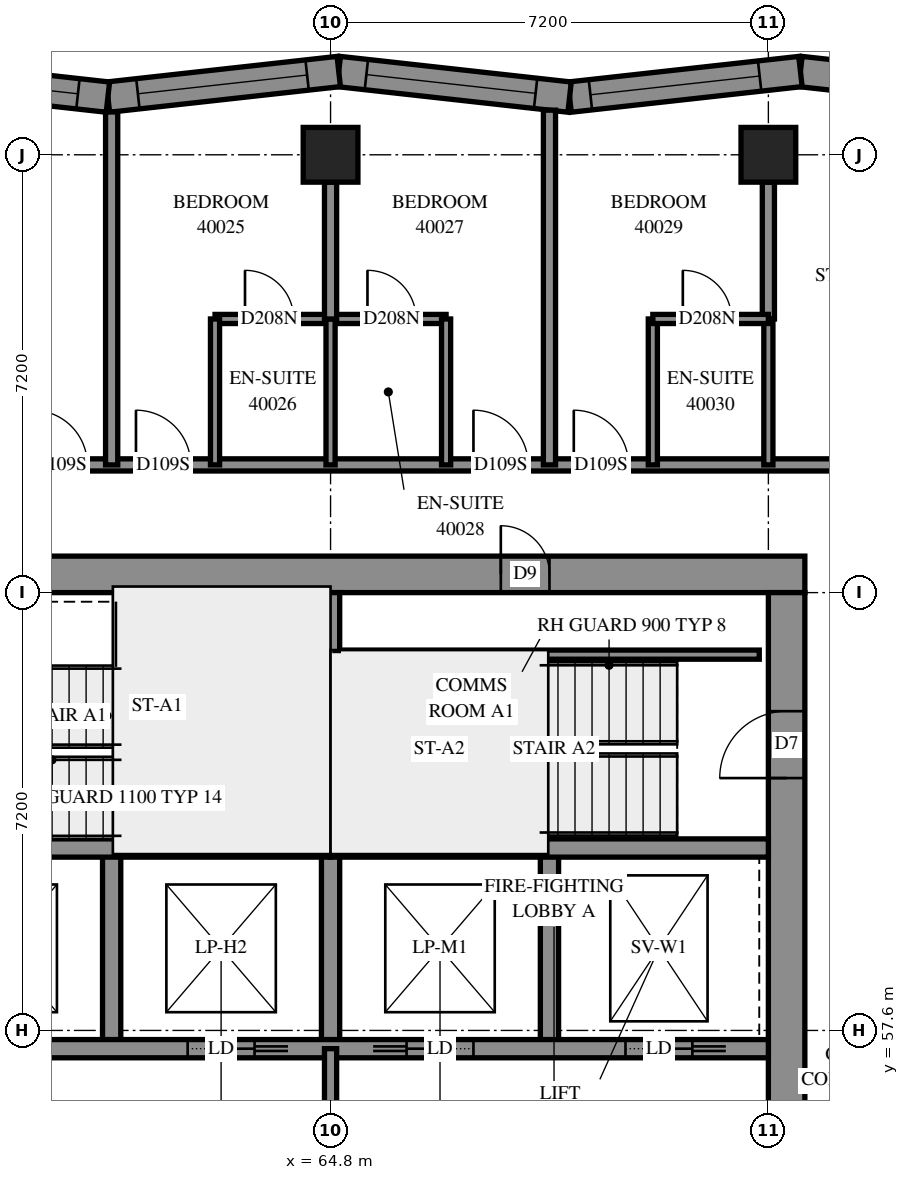
"""IFC4 building model, lengths in metres.
Left out: names, types, materials, properties, quantities, classifications, styles, units other than length and angle.
Written with IfcOpenShell. Run it as: python <this file> out.ifc"""

import sys

from ifc_helpers import new_model, si_unit, direction, frame, frame_2d, origin, origin_2d, place, context, subcontext, project, spatial, polyline, rectangle, outline, extrude, element, fill, save


model = new_model("IFC4")
c1 = context("Model", 3, precision=1e-05, world=origin(), true_north=direction((0.0, 1.0)))
c2 = subcontext(c1, "Body", "Model", "MODEL_VIEW")
j1 = project(units=[si_unit("LENGTHUNIT", "METRE"), si_unit("PLANEANGLEUNIT", "RADIAN")], contexts=[c1])
p1 = place(None, origin())
s1 = spatial("IfcSite", under=j1, at=p1, CompositionType="ELEMENT")
p2 = place(p1, origin())
s2 = spatial("IfcBuilding", under=s1, at=p2, CompositionType="ELEMENT")
p3 = place(p2, frame((0.0, 0.0, 149.0)))
s3 = spatial("IfcBuildingStorey", under=s2, at=p3, CompositionType="ELEMENT", Elevation=149.0)
for number, where, z_axis, x_axis in (
    (1, (64.8, 72.0, 0.0), (0.0, 0.0, 1.0), (1.0, 0.0, 0.0)),
    (2, (72.0, 72.0, 0.0), (0.0, 0.0, 1.0), (1.0, 0.0, 0.0)),
):
    element("IfcColumn", number, at=place(p3, frame(where, z_axis=z_axis, x_axis=x_axis)), inside=s3, PredefinedType="COLUMN", context=c2, shape_type="SweptSolid", body=[
        extrude(rectangle(XDim=0.9, YDim=0.9, at=origin_2d()), origin(), (0.0, 0.0, 1.0), 3.1),
    ])
p4 = place(p3, frame((57.0, 65.1, -0.3), z_axis=(0.0, 0.0, 1.0), x_axis=(1.0, 0.0, 0.0)))
e3 = element("IfcWall", 3, at=p4, inside=s3, PredefinedType="SHEAR", context=c2, shape_type="SweptSolid", body=[
    extrude(rectangle(XDim=15.6, YDim=0.6, at=frame_2d((7.8, 0.0))), origin(), (0.0, 0.0, 1.0), 2.7),
])
p5 = place(p4, frame((10.6, 0.0, 0.3)))
e4 = element("IfcOpeningElement", 4, at=p5, cuts=e3, PredefinedType="OPENING", context=c2, shape_type="SweptSolid", body=[
    extrude(rectangle(XDim=0.8, YDim=2.1, at=frame_2d((0.4, 1.05))), frame((0.0, 0.31, 0.0), z_axis=(0.0, -1.0, 0.0), x_axis=(1.0, 0.0, 0.0)), (0.0, 0.0, 1.0), 0.62),
])
p6 = place(p3, frame((72.3, 50.4, -0.3), z_axis=(0.0, 0.0, 1.0), x_axis=(0.0, 1.0, 0.0)))
e5 = element("IfcWall", 5, at=p6, inside=s3, PredefinedType="SHEAR", context=c2, shape_type="SweptSolid", body=[
    extrude(rectangle(XDim=14.4, YDim=0.6, at=frame_2d((7.2, 0.0))), origin(), (0.0, 0.0, 1.0), 2.7),
])
p7 = place(p6, frame((4.55, 0.0, 0.3)))
e6 = element("IfcOpeningElement", 6, at=p7, cuts=e5, PredefinedType="OPENING", context=c2, shape_type="SweptSolid", body=[
    extrude(rectangle(XDim=1.1, YDim=2.1, at=frame_2d((0.55, 1.05))), frame((0.0, 0.31, 0.0), z_axis=(0.0, -1.0, 0.0), x_axis=(1.0, 0.0, 0.0)), (0.0, 0.0, 1.0), 0.62),
])
p8 = place(p6, frame((11.35, 0.0, 0.3)))
e7 = element("IfcOpeningElement", 7, at=p8, cuts=e5, PredefinedType="OPENING", context=c2, shape_type="SweptSolid", body=[
    extrude(rectangle(XDim=1.1, YDim=2.1, at=frame_2d((0.55, 1.05))), frame((0.0, 0.31, 0.0), z_axis=(0.0, -1.0, 0.0), x_axis=(1.0, 0.0, 0.0)), (0.0, 0.0, 1.0), 0.62),
])
for number, where, z_axis, x_axis in (
    (8, (61.2, 57.3, 0.0), (0.0, 0.0, 1.0), (0.0, 1.0, 0.0)),
    (9, (64.8, 57.3, 0.0), (0.0, 0.0, 1.0), (0.0, 1.0, 0.0)),
    (10, (68.4, 57.3, 0.0), (0.0, 0.0, 1.0), (0.0, 1.0, 0.0)),
):
    element("IfcWall", number, at=place(p3, frame(where, z_axis=z_axis, x_axis=x_axis)), inside=s3, PredefinedType="SOLIDWALL", context=c2, shape_type="SweptSolid", body=[
        extrude(rectangle(XDim=3.3, YDim=0.3, at=frame_2d((1.65, 0.0))), origin(), (0.0, 0.0, 1.0), 3.1),
    ])
p9 = place(p3, frame((57.6, 57.3, 0.0), z_axis=(0.0, 0.0, 1.0), x_axis=(1.0, 0.0, 0.0)))
e11 = element("IfcWall", 11, at=p9, inside=s3, PredefinedType="SOLIDWALL", context=c2, shape_type="SweptSolid", body=[
    extrude(rectangle(XDim=14.4, YDim=0.3, at=frame_2d((7.2, 0.0))), origin(), (0.0, 0.0, 1.0), 3.1),
])
p10 = place(p9, frame((1.25, 0.0, 0.0)))
e12 = element("IfcOpeningElement", 12, at=p10, cuts=e11, PredefinedType="OPENING", context=c2, shape_type="SweptSolid", body=[
    extrude(rectangle(XDim=1.1, YDim=2.1, at=frame_2d((0.55, 1.05))), frame((0.0, 0.16, 0.0), z_axis=(0.0, -1.0, 0.0), x_axis=(1.0, 0.0, 0.0)), (0.0, 0.0, 1.0), 0.32),
])
p11 = place(p9, frame((4.85, 0.0, 0.0)))
e13 = element("IfcOpeningElement", 13, at=p11, cuts=e11, PredefinedType="OPENING", context=c2, shape_type="SweptSolid", body=[
    extrude(rectangle(XDim=1.1, YDim=2.1, at=frame_2d((0.55, 1.05))), frame((0.0, 0.16, 0.0), z_axis=(0.0, -1.0, 0.0), x_axis=(1.0, 0.0, 0.0)), (0.0, 0.0, 1.0), 0.32),
])
p12 = place(p9, frame((8.45, 0.0, 0.0)))
e14 = element("IfcOpeningElement", 14, at=p12, cuts=e11, PredefinedType="OPENING", context=c2, shape_type="SweptSolid", body=[
    extrude(rectangle(XDim=1.1, YDim=2.1, at=frame_2d((0.55, 1.05))), frame((0.0, 0.16, 0.0), z_axis=(0.0, -1.0, 0.0), x_axis=(1.0, 0.0, 0.0)), (0.0, 0.0, 1.0), 0.32),
])
p13 = place(p9, frame((12.05, 0.0, 0.0)))
e15 = element("IfcOpeningElement", 15, at=p13, cuts=e11, PredefinedType="OPENING", context=c2, shape_type="SweptSolid", body=[
    extrude(rectangle(XDim=1.1, YDim=2.1, at=frame_2d((0.55, 1.05))), frame((0.0, 0.16, 0.0), z_axis=(0.0, -1.0, 0.0), x_axis=(1.0, 0.0, 0.0)), (0.0, 0.0, 1.0), 0.32),
])
for number, where, z_axis, x_axis in (
    (16, (57.6, 60.6, 0.0), (0.0, 0.0, 1.0), (1.0, 0.0, 0.0)),
    (17, (64.8, 60.6, 0.0), (0.0, 0.0, 1.0), (1.0, 0.0, 0.0)),
):
    element("IfcWall", number, at=place(p3, frame(where, z_axis=z_axis, x_axis=x_axis)), inside=s3, PredefinedType="SOLIDWALL", context=c2, shape_type="SweptSolid", body=[
        extrude(rectangle(XDim=7.2, YDim=0.3, at=frame_2d((3.6, 0.0))), origin(), (0.0, 0.0, 1.0), 3.1),
    ])
p14 = place(p3, frame((64.8, 60.6, 0.0), z_axis=(0.0, 0.0, 1.0), x_axis=(0.0, 1.0, 0.0)))
e18 = element("IfcWall", 18, at=p14, inside=s3, PredefinedType="SOLIDWALL", context=c2, shape_type="SweptSolid", body=[
    extrude(rectangle(XDim=4.2, YDim=0.3, at=frame_2d((2.1, 0.0))), origin(), (0.0, 0.0, 1.0), 3.1),
])
p15 = place(p3, frame((76.343, 72.946, 0.0), z_axis=(0.0, 0.0, 1.0), x_axis=(-0.9939056334, 0.1102342595, 0.0)))
e19 = element("IfcWall", 19, at=p15, inside=s3, PredefinedType="SOLIDWALL", context=c2, shape_type="SweptSolid", body=[
    extrude(outline(polyline([(0.047, -0.25), (3.867, -0.25), (3.811, 0.25), (-0.047, 0.25), (0.047, -0.25)])), origin(), (0.0, 0.0, 1.0), 3.1),
])
p16 = place(p15, frame((1.579, 0.0, 0.45)))
e20 = element("IfcOpeningElement", 20, at=p16, cuts=e19, PredefinedType="OPENING", context=c2, shape_type="SweptSolid", body=[
    extrude(rectangle(XDim=1.2, YDim=2.5, at=frame_2d((0.6, 1.25))), frame((0.0, 0.26, 0.0), z_axis=(0.0, -1.0, 0.0), x_axis=(1.0, 0.0, 0.0)), (0.0, 0.0, 1.0), 0.52),
])
p17 = place(p3, frame((72.527, 73.37, 0.0), z_axis=(0.0, 0.0, 1.0), x_axis=(-0.99390702, -0.1102217568, 0.0)))
e21 = element("IfcWall", 21, at=p17, inside=s3, PredefinedType="SOLIDWALL", context=c2, shape_type="SweptSolid", body=[
    extrude(outline(polyline([(-0.028, -0.25), (3.792, -0.25), (3.847, 0.25), (0.028, 0.25), (-0.028, -0.25)])), origin(), (0.0, 0.0, 1.0), 3.1),
])
p18 = place(p17, frame((0.675, 0.0, 0.45)))
e22 = element("IfcOpeningElement", 22, at=p18, cuts=e21, PredefinedType="OPENING", context=c2, shape_type="SweptSolid", body=[
    extrude(rectangle(XDim=2.8, YDim=2.5, at=frame_2d((1.4, 1.25))), frame((0.0, 0.26, 0.0), z_axis=(0.0, -1.0, 0.0), x_axis=(1.0, 0.0, 0.0)), (0.0, 0.0, 1.0), 0.52),
])
p19 = place(p3, frame((68.731, 72.948, 0.0), z_axis=(0.0, 0.0, 1.0), x_axis=(-0.99390702, 0.1102217568, 0.0)))
e23 = element("IfcWall", 23, at=p19, inside=s3, PredefinedType="SOLIDWALL", context=c2, shape_type="SweptSolid", body=[
    extrude(outline(polyline([(0.028, -0.25), (3.847, -0.25), (3.792, 0.25), (-0.028, 0.25), (0.028, -0.25)])), origin(), (0.0, 0.0, 1.0), 3.1),
])
p20 = place(p19, frame((0.562, 0.0, 0.45)))
e24 = element("IfcOpeningElement", 24, at=p20, cuts=e23, PredefinedType="OPENING", context=c2, shape_type="SweptSolid", body=[
    extrude(rectangle(XDim=2.8, YDim=2.5, at=frame_2d((1.4, 1.25))), frame((0.0, 0.26, 0.0), z_axis=(0.0, -1.0, 0.0), x_axis=(1.0, 0.0, 0.0)), (0.0, 0.0, 1.0), 0.52),
])
p21 = place(p3, frame((64.935, 73.37, 0.0), z_axis=(0.0, 0.0, 1.0), x_axis=(-0.993907338, -0.1102188888, 0.0)))
e25 = element("IfcWall", 25, at=p21, inside=s3, PredefinedType="SOLIDWALL", context=c2, shape_type="SweptSolid", body=[
    extrude(outline(polyline([(-0.028, -0.25), (3.792, -0.25), (3.847, 0.25), (0.028, 0.25), (-0.028, -0.25)])), origin(), (0.0, 0.0, 1.0), 3.1),
])
p22 = place(p21, frame((0.524, 0.0, 0.45)))
e26 = element("IfcOpeningElement", 26, at=p22, cuts=e25, PredefinedType="OPENING", context=c2, shape_type="SweptSolid", body=[
    extrude(rectangle(XDim=2.8, YDim=2.5, at=frame_2d((1.4, 1.25))), frame((0.0, 0.26, 0.0), z_axis=(0.0, -1.0, 0.0), x_axis=(1.0, 0.0, 0.0)), (0.0, 0.0, 1.0), 0.52),
])
p23 = place(p3, frame((61.138, 72.948, 0.0), z_axis=(0.0, 0.0, 1.0), x_axis=(-0.99390702, 0.1102217568, 0.0)))
e27 = element("IfcWall", 27, at=p23, inside=s3, PredefinedType="SOLIDWALL", context=c2, shape_type="SweptSolid", body=[
    extrude(outline(polyline([(0.028, -0.25), (3.847, -0.25), (3.792, 0.25), (-0.028, 0.25), (0.028, -0.25)])), origin(), (0.0, 0.0, 1.0), 3.1),
])
p24 = place(p23, frame((0.496, 0.0, 0.45)))
e28 = element("IfcOpeningElement", 28, at=p24, cuts=e27, PredefinedType="OPENING", context=c2, shape_type="SweptSolid", body=[
    extrude(rectangle(XDim=2.8, YDim=2.5, at=frame_2d((1.4, 1.25))), frame((0.0, 0.26, 0.0), z_axis=(0.0, -1.0, 0.0), x_axis=(1.0, 0.0, 0.0)), (0.0, 0.0, 1.0), 0.52),
])
p25 = place(p3, frame((64.95, 63.78, 0.0), z_axis=(0.0, 0.0, 1.0), x_axis=(1.0, 0.0, 0.0)))
e29 = element("IfcWall", 29, at=p25, inside=s3, PredefinedType="PARTITIONING", context=c2, shape_type="SweptSolid", body=[
    extrude(rectangle(XDim=6.9, YDim=0.15, at=frame_2d((3.45, 0.0))), origin(), (0.0, 0.0, 1.0), 3.1),
])
p26 = place(p3, frame((64.8, 53.7, 0.0), z_axis=(0.0, 0.0, 1.0), x_axis=(0.0, 1.0, 0.0)))
e30 = element("IfcWall", 30, at=p26, inside=s3, PredefinedType="PARTITIONING", context=c2, shape_type="SweptSolid", body=[
    extrude(rectangle(XDim=3.6, YDim=0.2, at=frame_2d((1.8, 0.0))), origin(), (0.0, 0.0, 1.0), 3.1),
])
p27 = place(p3, frame((55.5, 66.9, 0.0), z_axis=(0.0, 0.0, 1.0), x_axis=(1.0, 0.0, 0.0)))
e31 = element("IfcWall", 31, at=p27, inside=s3, PredefinedType="PARTITIONING", context=c2, shape_type="SweptSolid", body=[
    extrude(rectangle(XDim=18.6, YDim=0.2, at=frame_2d((9.3, 0.0))), origin(), (0.0, 0.0, 1.0), 3.1),
])
p28 = place(p27, frame((4.4, 0.0, 0.0)))
e32 = element("IfcOpeningElement", 32, at=p28, cuts=e31, PredefinedType="OPENING", context=c2, shape_type="SweptSolid", body=[
    extrude(rectangle(XDim=0.9, YDim=2.1, at=frame_2d((0.45, 1.05))), frame((0.0, 0.11, 0.0), z_axis=(0.0, -1.0, 0.0), x_axis=(1.0, 0.0, 0.0)), (0.0, 0.0, 1.0), 0.22),
])
p29 = place(p27, frame((6.1, 0.0, 0.0)))
e33 = element("IfcOpeningElement", 33, at=p29, cuts=e31, PredefinedType="OPENING", context=c2, shape_type="SweptSolid", body=[
    extrude(rectangle(XDim=0.9, YDim=2.1, at=frame_2d((0.45, 1.05))), frame((0.0, 0.11, 0.0), z_axis=(0.0, -1.0, 0.0), x_axis=(1.0, 0.0, 0.0)), (0.0, 0.0, 1.0), 0.22),
])
p30 = place(p27, frame((11.65, 0.0, 0.0)))
e34 = element("IfcOpeningElement", 34, at=p30, cuts=e31, PredefinedType="OPENING", context=c2, shape_type="SweptSolid", body=[
    extrude(rectangle(XDim=0.9, YDim=2.1, at=frame_2d((0.45, 1.05))), frame((0.0, 0.11, 0.0), z_axis=(0.0, -1.0, 0.0), x_axis=(1.0, 0.0, 0.0)), (0.0, 0.0, 1.0), 0.22),
])
p31 = place(p27, frame((13.3, 0.0, 0.0)))
e35 = element("IfcOpeningElement", 35, at=p31, cuts=e31, PredefinedType="OPENING", context=c2, shape_type="SweptSolid", body=[
    extrude(rectangle(XDim=0.9, YDim=2.1, at=frame_2d((0.45, 1.05))), frame((0.0, 0.11, 0.0), z_axis=(0.0, -1.0, 0.0), x_axis=(1.0, 0.0, 0.0)), (0.0, 0.0, 1.0), 0.22),
])
p32 = place(p3, frame((68.4, 66.9, 0.0), z_axis=(0.0, 0.0, 1.0), x_axis=(0.0, 1.0, 0.0)))
e36 = element("IfcWall", 36, at=p32, inside=s3, PredefinedType="PARTITIONING", context=c2, shape_type="SweptSolid", body=[
    extrude(rectangle(XDim=5.834, YDim=0.2, at=frame_2d((2.917, 0.0))), origin(), (0.0, 0.0, 1.0), 3.1),
])
p33 = place(p3, frame((61.2, 66.9, 0.0), z_axis=(0.0, 0.0, 1.0), x_axis=(0.0, 1.0, 0.0)))
e37 = element("IfcWall", 37, at=p33, inside=s3, PredefinedType="PARTITIONING", context=c2, shape_type="SweptSolid", body=[
    extrude(rectangle(XDim=5.804, YDim=0.2, at=frame_2d((2.902, 0.0))), origin(), (0.0, 0.0, 1.0), 3.1),
])
p34 = place(p3, frame((62.9, 69.3, 0.0), z_axis=(0.0, 0.0, 1.0), x_axis=(1.0, 0.0, 0.0)))
e38 = element("IfcWall", 38, at=p34, inside=s3, PredefinedType="PARTITIONING", context=c2, shape_type="SweptSolid", body=[
    extrude(rectangle(XDim=3.8, YDim=0.15, at=frame_2d((1.9, 0.0))), origin(), (0.0, 0.0, 1.0), 3.1),
])
p35 = place(p34, frame((0.493, 0.0, 0.0)))
e39 = element("IfcOpeningElement", 39, at=p35, cuts=e38, PredefinedType="OPENING", context=c2, shape_type="SweptSolid", body=[
    extrude(rectangle(XDim=0.8, YDim=2.1, at=frame_2d((0.4, 1.05))), frame((0.0, 0.085, 0.0), z_axis=(0.0, -1.0, 0.0), x_axis=(1.0, 0.0, 0.0)), (0.0, 0.0, 1.0), 0.17),
])
p36 = place(p34, frame((2.507, 0.0, 0.0)))
e40 = element("IfcOpeningElement", 40, at=p36, cuts=e38, PredefinedType="OPENING", context=c2, shape_type="SweptSolid", body=[
    extrude(rectangle(XDim=0.8, YDim=2.1, at=frame_2d((0.4, 1.05))), frame((0.0, 0.085, 0.0), z_axis=(0.0, -1.0, 0.0), x_axis=(1.0, 0.0, 0.0)), (0.0, 0.0, 1.0), 0.17),
])
for number, where, z_axis, x_axis in (
    (41, (62.9, 66.9, 0.0), (0.0, 0.0, 1.0), (0.0, 1.0, 0.0)),
    (42, (64.8, 66.9, 0.0), (0.0, 0.0, 1.0), (0.0, 1.0, 0.0)),
    (43, (66.7, 66.9, 0.0), (0.0, 0.0, 1.0), (0.0, 1.0, 0.0)),
    (44, (70.1, 66.9, 0.0), (0.0, 0.0, 1.0), (0.0, 1.0, 0.0)),
    (45, (72.0, 66.9, 0.0), (0.0, 0.0, 1.0), (0.0, 1.0, 0.0)),
):
    element("IfcWall", number, at=place(p3, frame(where, z_axis=z_axis, x_axis=x_axis)), inside=s3, PredefinedType="PARTITIONING", context=c2, shape_type="SweptSolid", body=[
        extrude(rectangle(XDim=2.4, YDim=0.15, at=frame_2d((1.2, 0.0))), origin(), (0.0, 0.0, 1.0), 3.1),
    ])
for number, where, z_axis, x_axis in (
    (46, (64.8, 69.3, 0.0), (0.0, 0.0, 1.0), (0.0, 1.0, 0.0)),
    (47, (72.0, 69.3, 0.0), (0.0, 0.0, 1.0), (0.0, 1.0, 0.0)),
):
    element("IfcWall", number, at=place(p3, frame(where, z_axis=z_axis, x_axis=x_axis)), inside=s3, PredefinedType="PARTITIONING", context=c2, shape_type="SweptSolid", body=[
        extrude(rectangle(XDim=2.25, YDim=0.2, at=frame_2d((1.125, 0.0))), origin(), (0.0, 0.0, 1.0), 3.1),
    ])
p37 = place(p3, frame((70.1, 69.3, 0.0), z_axis=(0.0, 0.0, 1.0), x_axis=(1.0, 0.0, 0.0)))
e48 = element("IfcWall", 48, at=p37, inside=s3, PredefinedType="PARTITIONING", context=c2, shape_type="SweptSolid", body=[
    extrude(rectangle(XDim=1.9, YDim=0.15, at=frame_2d((0.95, 0.0))), origin(), (0.0, 0.0, 1.0), 3.1),
])
p38 = place(p37, frame((0.493, 0.0, 0.0)))
e49 = element("IfcOpeningElement", 49, at=p38, cuts=e48, PredefinedType="OPENING", context=c2, shape_type="SweptSolid", body=[
    extrude(rectangle(XDim=0.8, YDim=2.1, at=frame_2d((0.4, 1.05))), frame((0.0, 0.085, 0.0), z_axis=(0.0, -1.0, 0.0), x_axis=(1.0, 0.0, 0.0)), (0.0, 0.0, 1.0), 0.17),
])
p39 = place(p18, origin())
e50 = element("IfcWindow", 50, at=p39, inside=s3, PartitioningType="SINGLE_PANEL", PredefinedType="WINDOW", context=c2, shape_type="SweptSolid", body=[
    extrude(rectangle(XDim=2.8, YDim=2.5, at=frame_2d((1.4, 1.25))), frame((0.0, 0.18, 0.0), z_axis=(0.0, -1.0, 0.0), x_axis=(1.0, 0.0, 0.0)), (0.0, 0.0, 1.0), 0.06),
])
fill(e22, e50)
p40 = place(p20, origin())
e51 = element("IfcWindow", 51, at=p40, inside=s3, PartitioningType="SINGLE_PANEL", PredefinedType="WINDOW", context=c2, shape_type="SweptSolid", body=[
    extrude(rectangle(XDim=2.8, YDim=2.5, at=frame_2d((1.4, 1.25))), frame((0.0, 0.18, 0.0), z_axis=(0.0, -1.0, 0.0), x_axis=(1.0, 0.0, 0.0)), (0.0, 0.0, 1.0), 0.06),
])
fill(e24, e51)
p41 = place(p22, origin())
e52 = element("IfcWindow", 52, at=p41, inside=s3, PartitioningType="SINGLE_PANEL", PredefinedType="WINDOW", context=c2, shape_type="SweptSolid", body=[
    extrude(rectangle(XDim=2.8, YDim=2.5, at=frame_2d((1.4, 1.25))), frame((0.0, 0.18, 0.0), z_axis=(0.0, -1.0, 0.0), x_axis=(1.0, 0.0, 0.0)), (0.0, 0.0, 1.0), 0.06),
])
fill(e26, e52)
p42 = place(p24, origin())
e53 = element("IfcWindow", 53, at=p42, inside=s3, PartitioningType="SINGLE_PANEL", PredefinedType="WINDOW", context=c2, shape_type="SweptSolid", body=[
    extrude(rectangle(XDim=2.8, YDim=2.5, at=frame_2d((1.4, 1.25))), frame((0.0, 0.18, 0.0), z_axis=(0.0, -1.0, 0.0), x_axis=(1.0, 0.0, 0.0)), (0.0, 0.0, 1.0), 0.06),
])
fill(e28, e53)
p43 = place(p5, origin())
e54 = element("IfcDoor", 54, at=p43, inside=s3, OperationType="SINGLE_SWING_RIGHT", PredefinedType="DOOR", context=c2, shape_type="SweptSolid", body=[
    extrude(rectangle(XDim=0.8, YDim=2.1, at=frame_2d((0.4, 1.05))), frame((0.0, 0.025, 0.0), z_axis=(0.0, -1.0, 0.0), x_axis=(1.0, 0.0, 0.0)), (0.0, 0.0, 1.0), 0.05),
])
fill(e4, e54)
p44 = place(p8, origin())
e55 = element("IfcDoor", 55, at=p44, inside=s3, OperationType="SINGLE_SWING_RIGHT", PredefinedType="DOOR", context=c2, shape_type="SweptSolid", body=[
    extrude(rectangle(XDim=1.1, YDim=2.1, at=frame_2d((0.55, 1.05))), frame((0.0, 0.025, 0.0), z_axis=(0.0, -1.0, 0.0), x_axis=(1.0, 0.0, 0.0)), (0.0, 0.0, 1.0), 0.05),
])
fill(e7, e55)
p45 = place(p11, origin())
e56 = element("IfcDoor", 56, at=p45, inside=s3, OperationType="SLIDING_TO_RIGHT", PredefinedType="DOOR", context=c2, shape_type="SweptSolid", body=[
    extrude(rectangle(XDim=1.1, YDim=2.1, at=frame_2d((0.55, 1.05))), frame((0.0, 0.025, 0.0), z_axis=(0.0, -1.0, 0.0), x_axis=(1.0, 0.0, 0.0)), (0.0, 0.0, 1.0), 0.05),
])
fill(e13, e56)
p46 = place(p12, origin())
e57 = element("IfcDoor", 57, at=p46, inside=s3, OperationType="SLIDING_TO_LEFT", PredefinedType="DOOR", context=c2, shape_type="SweptSolid", body=[
    extrude(rectangle(XDim=1.1, YDim=2.1, at=frame_2d((0.55, 1.05))), frame((0.0, 0.025, 0.0), z_axis=(0.0, -1.0, 0.0), x_axis=(1.0, 0.0, 0.0)), (0.0, 0.0, 1.0), 0.05),
])
fill(e14, e57)
p47 = place(p13, origin())
e58 = element("IfcDoor", 58, at=p47, inside=s3, OperationType="SLIDING_TO_RIGHT", PredefinedType="DOOR", context=c2, shape_type="SweptSolid", body=[
    extrude(rectangle(XDim=1.1, YDim=2.1, at=frame_2d((0.55, 1.05))), frame((0.0, 0.025, 0.0), z_axis=(0.0, -1.0, 0.0), x_axis=(1.0, 0.0, 0.0)), (0.0, 0.0, 1.0), 0.05),
])
fill(e15, e58)
p48 = place(p28, origin())
e59 = element("IfcDoor", 59, at=p48, inside=s3, OperationType="SINGLE_SWING_RIGHT", PredefinedType="DOOR", context=c2, shape_type="SweptSolid", body=[
    extrude(rectangle(XDim=0.9, YDim=2.1, at=frame_2d((0.45, 1.05))), frame((0.0, 0.025, 0.0), z_axis=(0.0, -1.0, 0.0), x_axis=(1.0, 0.0, 0.0)), (0.0, 0.0, 1.0), 0.05),
])
fill(e32, e59)
p49 = place(p29, origin())
e60 = element("IfcDoor", 60, at=p49, inside=s3, OperationType="SINGLE_SWING_LEFT", PredefinedType="DOOR", context=c2, shape_type="SweptSolid", body=[
    extrude(rectangle(XDim=0.9, YDim=2.1, at=frame_2d((0.45, 1.05))), frame((0.0, 0.025, 0.0), z_axis=(0.0, -1.0, 0.0), x_axis=(1.0, 0.0, 0.0)), (0.0, 0.0, 1.0), 0.05),
])
fill(e33, e60)
p50 = place(p35, origin())
e61 = element("IfcDoor", 61, at=p50, inside=s3, OperationType="SINGLE_SWING_RIGHT", PredefinedType="DOOR", context=c2, shape_type="SweptSolid", body=[
    extrude(rectangle(XDim=0.8, YDim=2.1, at=frame_2d((0.4, 1.05))), frame((0.0, 0.025, 0.0), z_axis=(0.0, -1.0, 0.0), x_axis=(1.0, 0.0, 0.0)), (0.0, 0.0, 1.0), 0.05),
])
fill(e39, e61)
p51 = place(p30, origin())
e62 = element("IfcDoor", 62, at=p51, inside=s3, OperationType="SINGLE_SWING_RIGHT", PredefinedType="DOOR", context=c2, shape_type="SweptSolid", body=[
    extrude(rectangle(XDim=0.9, YDim=2.1, at=frame_2d((0.45, 1.05))), frame((0.0, 0.025, 0.0), z_axis=(0.0, -1.0, 0.0), x_axis=(1.0, 0.0, 0.0)), (0.0, 0.0, 1.0), 0.05),
])
fill(e34, e62)
p52 = place(p36, origin())
e63 = element("IfcDoor", 63, at=p52, inside=s3, OperationType="SINGLE_SWING_RIGHT", PredefinedType="DOOR", context=c2, shape_type="SweptSolid", body=[
    extrude(rectangle(XDim=0.8, YDim=2.1, at=frame_2d((0.4, 1.05))), frame((0.0, 0.025, 0.0), z_axis=(0.0, -1.0, 0.0), x_axis=(1.0, 0.0, 0.0)), (0.0, 0.0, 1.0), 0.05),
])
fill(e40, e63)
p53 = place(p31, origin())
e64 = element("IfcDoor", 64, at=p53, inside=s3, OperationType="SINGLE_SWING_LEFT", PredefinedType="DOOR", context=c2, shape_type="SweptSolid", body=[
    extrude(rectangle(XDim=0.9, YDim=2.1, at=frame_2d((0.45, 1.05))), frame((0.0, 0.025, 0.0), z_axis=(0.0, -1.0, 0.0), x_axis=(1.0, 0.0, 0.0)), (0.0, 0.0, 1.0), 0.05),
])
fill(e35, e64)
p54 = place(p38, origin())
e65 = element("IfcDoor", 65, at=p54, inside=s3, OperationType="SINGLE_SWING_RIGHT", PredefinedType="DOOR", context=c2, shape_type="SweptSolid", body=[
    extrude(rectangle(XDim=0.8, YDim=2.1, at=frame_2d((0.4, 1.05))), frame((0.0, 0.025, 0.0), z_axis=(0.0, -1.0, 0.0), x_axis=(1.0, 0.0, 0.0)), (0.0, 0.0, 1.0), 0.05),
])
fill(e49, e65)
save(model, sys.argv[1])
